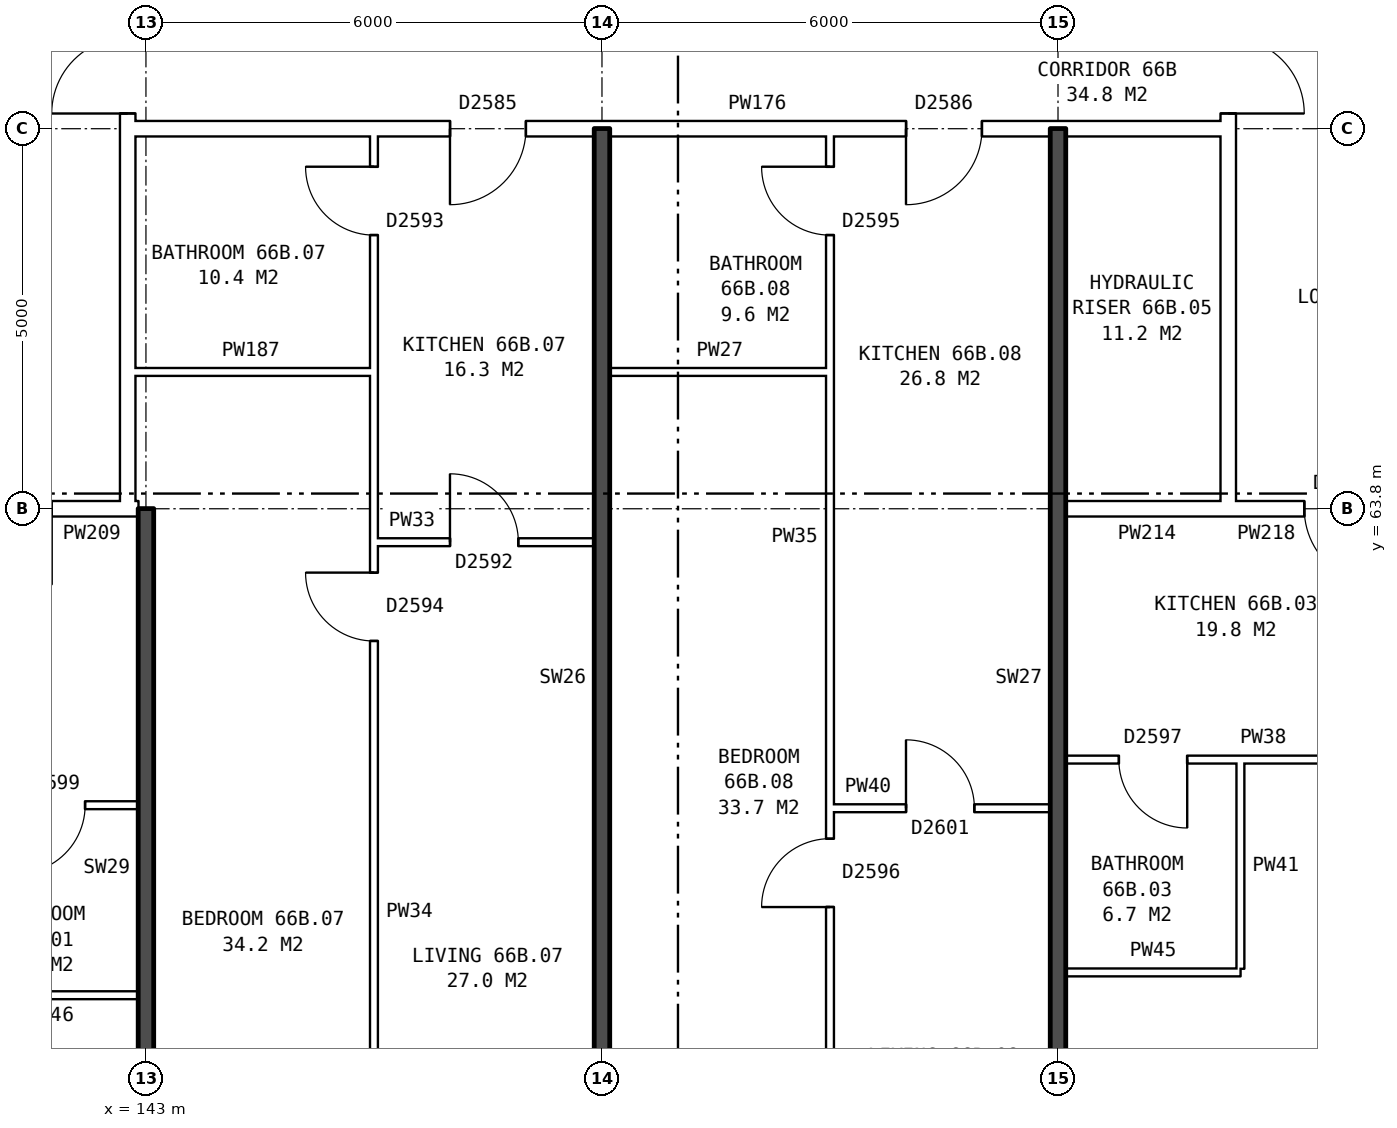
"""IFC4 building model, lengths in metres.
Left out: names, types, materials, properties, quantities, classifications, styles, units other than length and angle.
Written with IfcOpenShell. Run it as: python <this file> out.ifc"""

import sys

from ifc_helpers import new_model, si_unit, direction, frame, frame_2d, origin, place, context, subcontext, project, spatial, rectangle, extrude, element, fill, save


model = new_model("IFC4")
c1 = context("Model", 3, precision=1e-05, world=origin(), true_north=direction((0.0, 1.0)))
c2 = subcontext(c1, "Body", "Model", "MODEL_VIEW")
j1 = project(units=[si_unit("LENGTHUNIT", "METRE"), si_unit("PLANEANGLEUNIT", "RADIAN")], contexts=[c1])
p1 = place(None, origin())
s1 = spatial("IfcSite", under=j1, at=p1, CompositionType="ELEMENT")
p2 = place(p1, origin())
s2 = spatial("IfcBuilding", under=s1, at=p2, CompositionType="ELEMENT")
p3 = place(p2, frame((0.0, 0.0, 233.8)))
s3 = spatial("IfcBuildingStorey", under=s2, at=p3, CompositionType="ELEMENT", Elevation=233.8)
p4 = place(p3, frame((142.76, 63.9, 0.0), z_axis=(0.0, 0.0, 1.0), x_axis=(0.0, 1.0, 0.0)))
e1 = element("IfcWall", 1, at=p4, inside=s3, PredefinedType="PARTITIONING", context=c2, shape_type="SweptSolid", body=[
    extrude(rectangle(XDim=12.2, YDim=0.2, at=frame_2d((6.1, 0.0))), origin(), (0.0, 0.0, 1.0), 2.85),
])
p5 = place(p4, frame((5.1, 0.0, 0.0)))
e2 = element("IfcOpeningElement", 2, at=p5, cuts=e1, PredefinedType="OPENING", context=c2, shape_type="SweptSolid", body=[
    extrude(rectangle(XDim=2.0, YDim=2.1, at=frame_2d((1.0, 1.05))), frame((0.0, 0.11, 0.0), z_axis=(0.0, -1.0, 0.0), x_axis=(1.0, 0.0, 0.0)), (0.0, 0.0, 1.0), 0.22),
])
p6 = place(p3, frame((157.24, 63.9, 0.0), z_axis=(0.0, 0.0, 1.0), x_axis=(0.0, 1.0, 0.0)))
e3 = element("IfcWall", 3, at=p6, inside=s3, PredefinedType="PARTITIONING", context=c2, shape_type="SweptSolid", body=[
    extrude(rectangle(XDim=12.2, YDim=0.2, at=frame_2d((6.1, 0.0))), origin(), (0.0, 0.0, 1.0), 2.85),
])
p7 = place(p6, frame((5.1, 0.0, 0.0)))
e4 = element("IfcOpeningElement", 4, at=p7, cuts=e3, PredefinedType="OPENING", context=c2, shape_type="SweptSolid", body=[
    extrude(rectangle(XDim=2.0, YDim=2.1, at=frame_2d((1.0, 1.05))), frame((0.0, 0.11, 0.0), z_axis=(0.0, -1.0, 0.0), x_axis=(1.0, 0.0, 0.0)), (0.0, 0.0, 1.0), 0.22),
])
for number, where, z_axis, x_axis in (
    (5, (140.6, 57.4, 0.0), (0.0, 0.0, 1.0), (1.0, 0.0, 0.0)),
    (6, (155.1, 57.7, 0.0), (0.0, 0.0, 1.0), (1.0, 0.0, 0.0)),
):
    element("IfcWall", number, at=place(p3, frame(where, z_axis=z_axis, x_axis=x_axis)), inside=s3, PredefinedType="PARTITIONING", context=c2, shape_type="SweptSolid", body=[
        extrude(rectangle(XDim=2.3, YDim=0.1, at=frame_2d((1.15, 0.0))), origin(), (0.0, 0.0, 1.0), 2.85),
    ])
p8 = place(p3, frame((152.0, 59.86, 0.0), z_axis=(0.0, 0.0, 1.0), x_axis=(1.0, 0.0, 0.0)))
e7 = element("IfcWall", 7, at=p8, inside=s3, PredefinedType="PARTITIONING", context=c2, shape_type="SweptSolid", body=[
    extrude(rectangle(XDim=2.9, YDim=0.1, at=frame_2d((1.45, 0.0))), origin(), (0.0, 0.0, 1.0), 2.85),
])
p9 = place(p8, frame((1.0, 0.0, 0.0)))
e8 = element("IfcOpeningElement", 8, at=p9, cuts=e7, PredefinedType="OPENING", context=c2, shape_type="SweptSolid", body=[
    extrude(rectangle(XDim=0.9, YDim=2.1, at=frame_2d((0.45, 1.05))), frame((0.0, 0.06, 0.0), z_axis=(0.0, -1.0, 0.0), x_axis=(1.0, 0.0, 0.0)), (0.0, 0.0, 1.0), 0.12),
])
p10 = place(p3, frame((137.1, 59.9, 0.0), z_axis=(0.0, 0.0, 1.0), x_axis=(1.0, 0.0, 0.0)))
e9 = element("IfcWall", 9, at=p10, inside=s3, PredefinedType="PARTITIONING", context=c2, shape_type="SweptSolid", body=[
    extrude(rectangle(XDim=5.8, YDim=0.1, at=frame_2d((2.9, 0.0))), origin(), (0.0, 0.0, 1.0), 2.85),
])
p11 = place(p10, frame((1.3, 0.0, 0.0)))
e10 = element("IfcOpeningElement", 10, at=p11, cuts=e9, PredefinedType="OPENING", context=c2, shape_type="SweptSolid", body=[
    extrude(rectangle(XDim=0.9, YDim=2.1, at=frame_2d((0.45, 1.05))), frame((0.0, 0.06, 0.0), z_axis=(0.0, -1.0, 0.0), x_axis=(1.0, 0.0, 0.0)), (0.0, 0.0, 1.0), 0.12),
])
p12 = place(p10, frame((4.2, 0.0, 0.0)))
e11 = element("IfcOpeningElement", 11, at=p12, cuts=e9, PredefinedType="OPENING", context=c2, shape_type="SweptSolid", body=[
    extrude(rectangle(XDim=0.9, YDim=2.1, at=frame_2d((0.45, 1.05))), frame((0.0, 0.06, 0.0), z_axis=(0.0, -1.0, 0.0), x_axis=(1.0, 0.0, 0.0)), (0.0, 0.0, 1.0), 0.12),
])
p13 = place(p3, frame((155.1, 60.5, 0.0), z_axis=(0.0, 0.0, 1.0), x_axis=(1.0, 0.0, 0.0)))
e12 = element("IfcWall", 12, at=p13, inside=s3, PredefinedType="PARTITIONING", context=c2, shape_type="SweptSolid", body=[
    extrude(rectangle(XDim=5.8, YDim=0.1, at=frame_2d((2.9, 0.0))), origin(), (0.0, 0.0, 1.0), 2.85),
])
p14 = place(p13, frame((3.6, 0.0, 0.0)))
e13 = element("IfcOpeningElement", 13, at=p14, cuts=e12, PredefinedType="OPENING", context=c2, shape_type="SweptSolid", body=[
    extrude(rectangle(XDim=0.9, YDim=2.1, at=frame_2d((0.45, 1.05))), frame((0.0, 0.06, 0.0), z_axis=(0.0, -1.0, 0.0), x_axis=(1.0, 0.0, 0.0)), (0.0, 0.0, 1.0), 0.12),
])
p15 = place(p13, frame((0.7, 0.0, 0.0)))
e14 = element("IfcOpeningElement", 14, at=p15, cuts=e12, PredefinedType="OPENING", context=c2, shape_type="SweptSolid", body=[
    extrude(rectangle(XDim=0.9, YDim=2.1, at=frame_2d((0.45, 1.05))), frame((0.0, 0.06, 0.0), z_axis=(0.0, -1.0, 0.0), x_axis=(1.0, 0.0, 0.0)), (0.0, 0.0, 1.0), 0.12),
])
p16 = place(p3, frame((146.0, 63.36, 0.0), z_axis=(0.0, 0.0, 1.0), x_axis=(1.0, 0.0, 0.0)))
e15 = element("IfcWall", 15, at=p16, inside=s3, PredefinedType="PARTITIONING", context=c2, shape_type="SweptSolid", body=[
    extrude(rectangle(XDim=2.9, YDim=0.1, at=frame_2d((1.45, 0.0))), origin(), (0.0, 0.0, 1.0), 2.85),
])
p17 = place(p16, frame((1.0, 0.0, 0.0)))
e16 = element("IfcOpeningElement", 16, at=p17, cuts=e15, PredefinedType="OPENING", context=c2, shape_type="SweptSolid", body=[
    extrude(rectangle(XDim=0.9, YDim=2.1, at=frame_2d((0.45, 1.05))), frame((0.0, 0.06, 0.0), z_axis=(0.0, -1.0, 0.0), x_axis=(1.0, 0.0, 0.0)), (0.0, 0.0, 1.0), 0.12),
])
p18 = place(p3, frame((139.76, 63.8, 0.0), z_axis=(0.0, 0.0, 1.0), x_axis=(1.0, 0.0, 0.0)))
e17 = element("IfcWall", 17, at=p18, inside=s3, PredefinedType="PARTITIONING", context=c2, shape_type="SweptSolid", body=[
    extrude(rectangle(XDim=3.0, YDim=0.2, at=frame_2d((1.5, 0.0))), origin(), (0.0, 0.0, 1.0), 2.85),
])
p19 = place(p18, frame((1.0, 0.0, 0.0)))
e18 = element("IfcOpeningElement", 18, at=p19, cuts=e17, PredefinedType="OPENING", context=c2, shape_type="SweptSolid", body=[
    extrude(rectangle(XDim=1.0, YDim=2.1, at=frame_2d((0.5, 1.05))), frame((0.0, 0.11, 0.0), z_axis=(0.0, -1.0, 0.0), x_axis=(1.0, 0.0, 0.0)), (0.0, 0.0, 1.0), 0.22),
])
p20 = place(p3, frame((142.76, 63.8, 0.0), z_axis=(0.0, 0.0, 1.0), x_axis=(1.0, 0.0, 0.0)))
e19 = element("IfcWall", 19, at=p20, inside=s3, PredefinedType="PARTITIONING", context=c2, shape_type="SweptSolid", body=[
    extrude(rectangle(XDim=0.14, YDim=0.2, at=frame_2d((0.07, 0.0))), origin(), (0.0, 0.0, 1.0), 2.85),
])
p21 = place(p3, frame((155.1, 63.8, 0.0), z_axis=(0.0, 0.0, 1.0), x_axis=(1.0, 0.0, 0.0)))
e20 = element("IfcWall", 20, at=p21, inside=s3, PredefinedType="PARTITIONING", context=c2, shape_type="SweptSolid", body=[
    extrude(rectangle(XDim=2.14, YDim=0.2, at=frame_2d((1.07, 0.0))), origin(), (0.0, 0.0, 1.0), 2.85),
])
p22 = place(p3, frame((157.24, 63.8, 0.0), z_axis=(0.0, 0.0, 1.0), x_axis=(1.0, 0.0, 0.0)))
e21 = element("IfcWall", 21, at=p22, inside=s3, PredefinedType="PARTITIONING", context=c2, shape_type="SweptSolid", body=[
    extrude(rectangle(XDim=3.0, YDim=0.2, at=frame_2d((1.5, 0.0))), origin(), (0.0, 0.0, 1.0), 2.85),
])
p23 = place(p22, frame((1.0, 0.0, 0.0)))
e22 = element("IfcOpeningElement", 22, at=p23, cuts=e21, PredefinedType="OPENING", context=c2, shape_type="SweptSolid", body=[
    extrude(rectangle(XDim=1.0, YDim=2.1, at=frame_2d((0.5, 1.05))), frame((0.0, 0.11, 0.0), z_axis=(0.0, -1.0, 0.0), x_axis=(1.0, 0.0, 0.0)), (0.0, 0.0, 1.0), 0.22),
])
p24 = place(p3, frame((142.76, 65.6, 0.0), z_axis=(0.0, 0.0, 1.0), x_axis=(1.0, 0.0, 0.0)))
e23 = element("IfcWall", 23, at=p24, inside=s3, PredefinedType="PARTITIONING", context=c2, shape_type="SweptSolid", body=[
    extrude(rectangle(XDim=3.24, YDim=0.1, at=frame_2d((1.62, 0.0))), origin(), (0.0, 0.0, 1.0), 2.85),
])
p25 = place(p3, frame((149.1, 65.6, 0.0), z_axis=(0.0, 0.0, 1.0), x_axis=(1.0, 0.0, 0.0)))
e24 = element("IfcWall", 24, at=p25, inside=s3, PredefinedType="PARTITIONING", context=c2, shape_type="SweptSolid", body=[
    extrude(rectangle(XDim=2.9, YDim=0.1, at=frame_2d((1.45, 0.0))), origin(), (0.0, 0.0, 1.0), 2.85),
])
p26 = place(p3, frame((142.76, 68.8, 0.0), z_axis=(0.0, 0.0, 1.0), x_axis=(1.0, 0.0, 0.0)))
e25 = element("IfcWall", 25, at=p26, inside=s3, PredefinedType="PARTITIONING", context=c2, shape_type="SweptSolid", body=[
    extrude(rectangle(XDim=14.48, YDim=0.2, at=frame_2d((7.24, 0.0))), origin(), (0.0, 0.0, 1.0), 2.85),
])
p27 = place(p26, frame((4.24, 0.0, 0.0)))
e26 = element("IfcOpeningElement", 26, at=p27, cuts=e25, PredefinedType="OPENING", context=c2, shape_type="SweptSolid", body=[
    extrude(rectangle(XDim=1.0, YDim=2.1, at=frame_2d((0.5, 1.05))), frame((0.0, 0.11, 0.0), z_axis=(0.0, -1.0, 0.0), x_axis=(1.0, 0.0, 0.0)), (0.0, 0.0, 1.0), 0.22),
])
p28 = place(p26, frame((10.24, 0.0, 0.0)))
e27 = element("IfcOpeningElement", 27, at=p28, cuts=e25, PredefinedType="OPENING", context=c2, shape_type="SweptSolid", body=[
    extrude(rectangle(XDim=1.0, YDim=2.1, at=frame_2d((0.5, 1.05))), frame((0.0, 0.11, 0.0), z_axis=(0.0, -1.0, 0.0), x_axis=(1.0, 0.0, 0.0)), (0.0, 0.0, 1.0), 0.22),
])
p29 = place(p3, frame((143.0, 54.36, 0.0), z_axis=(0.0, 0.0, 1.0), x_axis=(0.0, 1.0, 0.0)))
e28 = element("IfcWall", 28, at=p29, inside=s3, PredefinedType="SOLIDWALL", context=c2, shape_type="SweptSolid", body=[
    extrude(rectangle(XDim=9.44, YDim=0.2, at=frame_2d((4.72, 0.0))), origin(), (0.0, 0.0, 1.0), 2.85),
])
p30 = place(p3, frame((146.0, 54.36, 0.0), z_axis=(0.0, 0.0, 1.0), x_axis=(0.0, 1.0, 0.0)))
e29 = element("IfcWall", 29, at=p30, inside=s3, PredefinedType="PARTITIONING", context=c2, shape_type="SweptSolid", body=[
    extrude(rectangle(XDim=14.34, YDim=0.1, at=frame_2d((7.17, 0.0))), origin(), (0.0, 0.0, 1.0), 2.85),
])
p31 = place(p30, frame((7.7, 0.0, 0.0)))
e30 = element("IfcOpeningElement", 30, at=p31, cuts=e29, PredefinedType="OPENING", context=c2, shape_type="SweptSolid", body=[
    extrude(rectangle(XDim=0.9, YDim=2.1, at=frame_2d((0.45, 1.05))), frame((0.0, 0.06, 0.0), z_axis=(0.0, -1.0, 0.0), x_axis=(1.0, 0.0, 0.0)), (0.0, 0.0, 1.0), 0.12),
])
p32 = place(p30, frame((13.04, 0.0, 0.0)))
e31 = element("IfcOpeningElement", 31, at=p32, cuts=e29, PredefinedType="OPENING", context=c2, shape_type="SweptSolid", body=[
    extrude(rectangle(XDim=0.9, YDim=2.1, at=frame_2d((0.45, 1.05))), frame((0.0, 0.06, 0.0), z_axis=(0.0, -1.0, 0.0), x_axis=(1.0, 0.0, 0.0)), (0.0, 0.0, 1.0), 0.12),
])
p33 = place(p3, frame((149.0, 54.36, 0.0), z_axis=(0.0, 0.0, 1.0), x_axis=(0.0, 1.0, 0.0)))
e32 = element("IfcWall", 32, at=p33, inside=s3, PredefinedType="SOLIDWALL", context=c2, shape_type="SweptSolid", body=[
    extrude(rectangle(XDim=14.44, YDim=0.2, at=frame_2d((7.22, 0.0))), origin(), (0.0, 0.0, 1.0), 2.85),
])
p34 = place(p3, frame((152.0, 54.36, 0.0), z_axis=(0.0, 0.0, 1.0), x_axis=(0.0, 1.0, 0.0)))
e33 = element("IfcWall", 33, at=p34, inside=s3, PredefinedType="PARTITIONING", context=c2, shape_type="SweptSolid", body=[
    extrude(rectangle(XDim=14.34, YDim=0.1, at=frame_2d((7.17, 0.0))), origin(), (0.0, 0.0, 1.0), 2.85),
])
p35 = place(p34, frame((4.2, 0.0, 0.0)))
e34 = element("IfcOpeningElement", 34, at=p35, cuts=e33, PredefinedType="OPENING", context=c2, shape_type="SweptSolid", body=[
    extrude(rectangle(XDim=0.9, YDim=2.1, at=frame_2d((0.45, 1.05))), frame((0.0, 0.06, 0.0), z_axis=(0.0, -1.0, 0.0), x_axis=(1.0, 0.0, 0.0)), (0.0, 0.0, 1.0), 0.12),
])
p36 = place(p34, frame((13.04, 0.0, 0.0)))
e35 = element("IfcOpeningElement", 35, at=p36, cuts=e33, PredefinedType="OPENING", context=c2, shape_type="SweptSolid", body=[
    extrude(rectangle(XDim=0.9, YDim=2.1, at=frame_2d((0.45, 1.05))), frame((0.0, 0.06, 0.0), z_axis=(0.0, -1.0, 0.0), x_axis=(1.0, 0.0, 0.0)), (0.0, 0.0, 1.0), 0.12),
])
p37 = place(p3, frame((155.0, 54.36, 0.0), z_axis=(0.0, 0.0, 1.0), x_axis=(0.0, 1.0, 0.0)))
e36 = element("IfcWall", 36, at=p37, inside=s3, PredefinedType="SOLIDWALL", context=c2, shape_type="SweptSolid", body=[
    extrude(rectangle(XDim=14.44, YDim=0.2, at=frame_2d((7.22, 0.0))), origin(), (0.0, 0.0, 1.0), 2.85),
])
p38 = place(p3, frame((157.4, 57.75, 0.0), z_axis=(0.0, 0.0, 1.0), x_axis=(0.0, 1.0, 0.0)))
e37 = element("IfcWall", 37, at=p38, inside=s3, PredefinedType="PARTITIONING", context=c2, shape_type="SweptSolid", body=[
    extrude(rectangle(XDim=2.7, YDim=0.1, at=frame_2d((1.35, 0.0))), origin(), (0.0, 0.0, 1.0), 2.85),
])
p39 = place(p5, origin())
e38 = element("IfcDoor", 38, at=p39, inside=s3, OperationType="DOUBLE_DOOR_SINGLE_SWING", PredefinedType="DOOR", context=c2, shape_type="SweptSolid", body=[
    extrude(rectangle(XDim=2.0, YDim=2.1, at=frame_2d((1.0, 1.05))), frame((0.0, 0.025, 0.0), z_axis=(0.0, -1.0, 0.0), x_axis=(1.0, 0.0, 0.0)), (0.0, 0.0, 1.0), 0.05),
])
fill(e2, e38)
p40 = place(p7, frame((2.0, 0.0, 0.0), z_axis=(0.0, 0.0, 1.0), x_axis=(-1.0, 0.0, 0.0)))
e39 = element("IfcDoor", 39, at=p40, inside=s3, OperationType="DOUBLE_DOOR_SINGLE_SWING", PredefinedType="DOOR", context=c2, shape_type="SweptSolid", body=[
    extrude(rectangle(XDim=2.0, YDim=2.1, at=frame_2d((1.0, 1.05))), frame((0.0, 0.025, 0.0), z_axis=(0.0, -1.0, 0.0), x_axis=(1.0, 0.0, 0.0)), (0.0, 0.0, 1.0), 0.05),
])
fill(e4, e39)
p41 = place(p12, frame((0.9, 0.0, 0.0), z_axis=(0.0, 0.0, 1.0), x_axis=(-1.0, 0.0, 0.0)))
e40 = element("IfcDoor", 40, at=p41, inside=s3, OperationType="SINGLE_SWING_RIGHT", PredefinedType="DOOR", context=c2, shape_type="SweptSolid", body=[
    extrude(rectangle(XDim=0.9, YDim=2.1, at=frame_2d((0.45, 1.05))), frame((0.0, 0.025, 0.0), z_axis=(0.0, -1.0, 0.0), x_axis=(1.0, 0.0, 0.0)), (0.0, 0.0, 1.0), 0.05),
])
fill(e11, e40)
p42 = place(p23, frame((1.0, 0.0, 0.0), z_axis=(0.0, 0.0, 1.0), x_axis=(-1.0, 0.0, 0.0)))
e41 = element("IfcDoor", 41, at=p42, inside=s3, OperationType="SINGLE_SWING_LEFT", PredefinedType="DOOR", context=c2, shape_type="SweptSolid", body=[
    extrude(rectangle(XDim=1.0, YDim=2.1, at=frame_2d((0.5, 1.05))), frame((0.0, 0.025, 0.0), z_axis=(0.0, -1.0, 0.0), x_axis=(1.0, 0.0, 0.0)), (0.0, 0.0, 1.0), 0.05),
])
fill(e22, e41)
p43 = place(p15, frame((0.9, 0.0, 0.0), z_axis=(0.0, 0.0, 1.0), x_axis=(-1.0, 0.0, 0.0)))
e42 = element("IfcDoor", 42, at=p43, inside=s3, OperationType="SINGLE_SWING_LEFT", PredefinedType="DOOR", context=c2, shape_type="SweptSolid", body=[
    extrude(rectangle(XDim=0.9, YDim=2.1, at=frame_2d((0.45, 1.05))), frame((0.0, 0.025, 0.0), z_axis=(0.0, -1.0, 0.0), x_axis=(1.0, 0.0, 0.0)), (0.0, 0.0, 1.0), 0.05),
])
fill(e14, e42)
p44 = place(p31, origin())
e43 = element("IfcDoor", 43, at=p44, inside=s3, OperationType="SINGLE_SWING_RIGHT", PredefinedType="DOOR", context=c2, shape_type="SweptSolid", body=[
    extrude(rectangle(XDim=0.9, YDim=2.1, at=frame_2d((0.45, 1.05))), frame((0.0, 0.025, 0.0), z_axis=(0.0, -1.0, 0.0), x_axis=(1.0, 0.0, 0.0)), (0.0, 0.0, 1.0), 0.05),
])
fill(e30, e43)
p45 = place(p27, frame((1.0, 0.0, 0.0), z_axis=(0.0, 0.0, 1.0), x_axis=(-1.0, 0.0, 0.0)))
e44 = element("IfcDoor", 44, at=p45, inside=s3, OperationType="SINGLE_SWING_RIGHT", PredefinedType="DOOR", context=c2, shape_type="SweptSolid", body=[
    extrude(rectangle(XDim=1.0, YDim=2.1, at=frame_2d((0.5, 1.05))), frame((0.0, 0.025, 0.0), z_axis=(0.0, -1.0, 0.0), x_axis=(1.0, 0.0, 0.0)), (0.0, 0.0, 1.0), 0.05),
])
fill(e26, e44)
p46 = place(p17, origin())
e45 = element("IfcDoor", 45, at=p46, inside=s3, OperationType="SINGLE_SWING_LEFT", PredefinedType="DOOR", context=c2, shape_type="SweptSolid", body=[
    extrude(rectangle(XDim=0.9, YDim=2.1, at=frame_2d((0.45, 1.05))), frame((0.0, 0.025, 0.0), z_axis=(0.0, -1.0, 0.0), x_axis=(1.0, 0.0, 0.0)), (0.0, 0.0, 1.0), 0.05),
])
fill(e16, e45)
p47 = place(p32, origin())
e46 = element("IfcDoor", 46, at=p47, inside=s3, OperationType="SINGLE_SWING_RIGHT", PredefinedType="DOOR", context=c2, shape_type="SweptSolid", body=[
    extrude(rectangle(XDim=0.9, YDim=2.1, at=frame_2d((0.45, 1.05))), frame((0.0, 0.025, 0.0), z_axis=(0.0, -1.0, 0.0), x_axis=(1.0, 0.0, 0.0)), (0.0, 0.0, 1.0), 0.05),
])
fill(e31, e46)
p48 = place(p35, origin())
e47 = element("IfcDoor", 47, at=p48, inside=s3, OperationType="SINGLE_SWING_LEFT", PredefinedType="DOOR", context=c2, shape_type="SweptSolid", body=[
    extrude(rectangle(XDim=0.9, YDim=2.1, at=frame_2d((0.45, 1.05))), frame((0.0, 0.025, 0.0), z_axis=(0.0, -1.0, 0.0), x_axis=(1.0, 0.0, 0.0)), (0.0, 0.0, 1.0), 0.05),
])
fill(e34, e47)
p49 = place(p28, frame((1.0, 0.0, 0.0), z_axis=(0.0, 0.0, 1.0), x_axis=(-1.0, 0.0, 0.0)))
e48 = element("IfcDoor", 48, at=p49, inside=s3, OperationType="SINGLE_SWING_RIGHT", PredefinedType="DOOR", context=c2, shape_type="SweptSolid", body=[
    extrude(rectangle(XDim=1.0, YDim=2.1, at=frame_2d((0.5, 1.05))), frame((0.0, 0.025, 0.0), z_axis=(0.0, -1.0, 0.0), x_axis=(1.0, 0.0, 0.0)), (0.0, 0.0, 1.0), 0.05),
])
fill(e27, e48)
p50 = place(p9, origin())
e49 = element("IfcDoor", 49, at=p50, inside=s3, OperationType="SINGLE_SWING_LEFT", PredefinedType="DOOR", context=c2, shape_type="SweptSolid", body=[
    extrude(rectangle(XDim=0.9, YDim=2.1, at=frame_2d((0.45, 1.05))), frame((0.0, 0.025, 0.0), z_axis=(0.0, -1.0, 0.0), x_axis=(1.0, 0.0, 0.0)), (0.0, 0.0, 1.0), 0.05),
])
fill(e8, e49)
p51 = place(p36, origin())
e50 = element("IfcDoor", 50, at=p51, inside=s3, OperationType="SINGLE_SWING_RIGHT", PredefinedType="DOOR", context=c2, shape_type="SweptSolid", body=[
    extrude(rectangle(XDim=0.9, YDim=2.1, at=frame_2d((0.45, 1.05))), frame((0.0, 0.025, 0.0), z_axis=(0.0, -1.0, 0.0), x_axis=(1.0, 0.0, 0.0)), (0.0, 0.0, 1.0), 0.05),
])
fill(e35, e50)
save(model, sys.argv[1])
